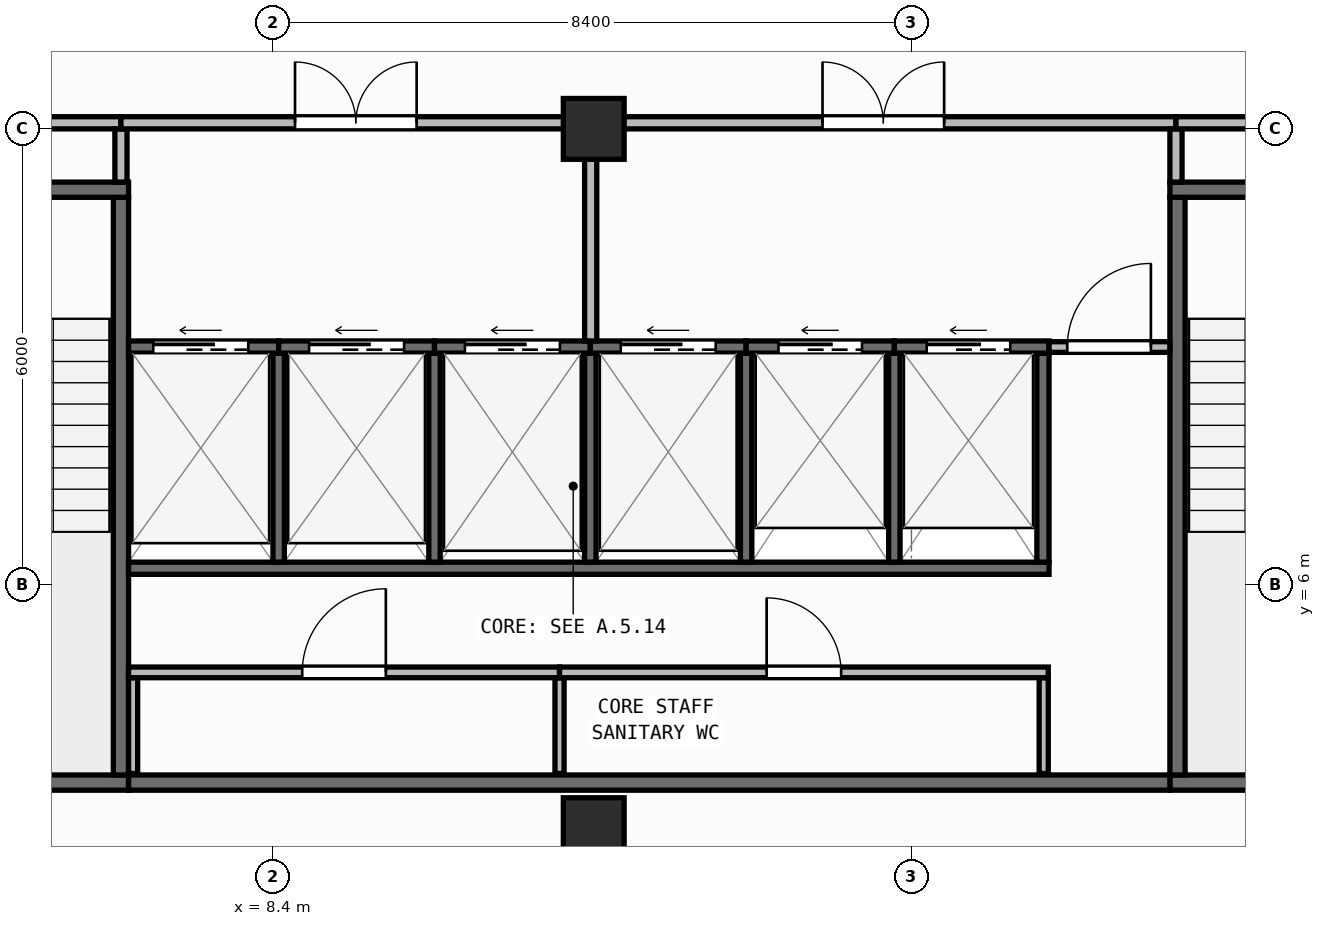
"""IFC4 building model, lengths in metres.
Left out: names, types, materials, properties, quantities, classifications, styles, units other than length and angle.
Written with IfcOpenShell. Run it as: python <this file> out.ifc"""

import sys

from ifc_helpers import new_model, si_unit, direction, frame, frame_2d, origin, origin_2d, place, context, subcontext, project, spatial, rectangle, extrude, element, fill, save


model = new_model("IFC4")
c1 = context("Model", 3, precision=1e-05, world=origin(), true_north=direction((0.0, 1.0)))
c2 = subcontext(c1, "Body", "Model", "MODEL_VIEW")
j1 = project(units=[si_unit("LENGTHUNIT", "METRE"), si_unit("PLANEANGLEUNIT", "RADIAN")], contexts=[c1])
p1 = place(None, origin())
s1 = spatial("IfcSite", under=j1, at=p1, CompositionType="ELEMENT")
p2 = place(p1, origin())
s2 = spatial("IfcBuilding", under=s1, at=p2, CompositionType="ELEMENT")
p3 = place(p2, frame((0.0, 0.0, 296.05)))
s3 = spatial("IfcBuildingStorey", under=s2, at=p3, CompositionType="ELEMENT", Elevation=296.05)
for number, where, z_axis, x_axis in (
    (1, (12.62, 2.8, 0.0), (0.0, 0.0, 1.0), (1.0, 0.0, 0.0)),
    (2, (12.62, 12.0, 0.0), (0.0, 0.0, 1.0), (1.0, 0.0, 0.0)),
):
    element("IfcColumn", number, at=place(p3, frame(where, z_axis=z_axis, x_axis=x_axis)), inside=s3, PredefinedType="COLUMN", context=c2, shape_type="SweptSolid", body=[
        extrude(rectangle(XDim=0.8, YDim=0.8, at=origin_2d()), origin(), (0.0, 0.0, 1.0), 3.95),
    ])
p4 = place(p3, frame((2.46, 0.171, 0.0), z_axis=(0.0, 0.0, 1.0), x_axis=(0.997760665813, 0.066885377746, 0.0)))
e3 = element("IfcWall", 3, at=p4, inside=s3, PredefinedType="STANDARD", context=c2, shape_type="SweptSolid", body=[
    extrude(rectangle(XDim=35.56, YDim=0.26, at=frame_2d((17.78, 0.0))), origin(), (0.0, 0.0, 1.0), 3.71),
])
p5 = place(p4, frame((16.58, 0.0, 0.9)))
e4 = element("IfcOpeningElement", 4, at=p5, cuts=e3, PredefinedType="OPENING", context=c2, shape_type="SweptSolid", body=[
    extrude(rectangle(XDim=2.4, YDim=1.65, at=frame_2d((1.2, 0.825))), frame((0.0, 0.14, 0.0), z_axis=(0.0, -1.0, 0.0), x_axis=(1.0, 0.0, 0.0)), (0.0, 0.0, 1.0), 0.28),
])
p6 = place(p3, frame((2.8, 3.4, 0.0), z_axis=(0.0, 0.0, 1.0), x_axis=(1.0, 0.0, 0.0)))
e5 = element("IfcWall", 5, at=p6, inside=s3, PredefinedType="SHEAR", context=c2, shape_type="SweptSolid", body=[
    extrude(rectangle(XDim=3.7, YDim=0.2, at=frame_2d((1.85, 0.0))), origin(), (0.0, 0.0, 1.0), 3.71),
])
p7 = place(p3, frame((6.4, 3.5, 0.0), z_axis=(0.0, 0.0, 1.0), x_axis=(0.0, 1.0, 0.0)))
e6 = element("IfcWall", 6, at=p7, inside=s3, PredefinedType="SHEAR", context=c2, shape_type="SweptSolid", body=[
    extrude(rectangle(XDim=7.6, YDim=0.2, at=frame_2d((3.8, 0.0))), origin(), (0.0, 0.0, 1.0), 3.71),
])
p8 = place(p3, frame((2.8, 11.2, 0.0), z_axis=(0.0, 0.0, 1.0), x_axis=(1.0, 0.0, 0.0)))
e7 = element("IfcWall", 7, at=p8, inside=s3, PredefinedType="SHEAR", context=c2, shape_type="SweptSolid", body=[
    extrude(rectangle(XDim=3.7, YDim=0.2, at=frame_2d((1.85, 0.0))), origin(), (0.0, 0.0, 1.0), 3.71),
])
p9 = place(p8, frame((1.2, 0.0, 0.0)))
e8 = element("IfcOpeningElement", 8, at=p9, cuts=e7, PredefinedType="OPENING", context=c2, shape_type="SweptSolid", body=[
    extrude(rectangle(XDim=1.3, YDim=2.15, at=frame_2d((0.65, 1.075))), frame((0.0, 0.11, 0.0), z_axis=(0.0, -1.0, 0.0), x_axis=(1.0, 0.0, 0.0)), (0.0, 0.0, 1.0), 0.22),
])
p10 = place(p3, frame((20.2, 3.4, 0.0), z_axis=(0.0, 0.0, 1.0), x_axis=(1.0, 0.0, 0.0)))
e9 = element("IfcWall", 9, at=p10, inside=s3, PredefinedType="SHEAR", context=c2, shape_type="SweptSolid", body=[
    extrude(rectangle(XDim=3.7, YDim=0.2, at=frame_2d((1.85, 0.0))), origin(), (0.0, 0.0, 1.0), 3.71),
])
p11 = place(p3, frame((20.3, 3.5, 0.0), z_axis=(0.0, 0.0, 1.0), x_axis=(0.0, 1.0, 0.0)))
e10 = element("IfcWall", 10, at=p11, inside=s3, PredefinedType="SHEAR", context=c2, shape_type="SweptSolid", body=[
    extrude(rectangle(XDim=7.6, YDim=0.2, at=frame_2d((3.8, 0.0))), origin(), (0.0, 0.0, 1.0), 3.71),
])
p12 = place(p3, frame((20.2, 11.2, 0.0), z_axis=(0.0, 0.0, 1.0), x_axis=(1.0, 0.0, 0.0)))
e11 = element("IfcWall", 11, at=p12, inside=s3, PredefinedType="SHEAR", context=c2, shape_type="SweptSolid", body=[
    extrude(rectangle(XDim=3.7, YDim=0.2, at=frame_2d((1.85, 0.0))), origin(), (0.0, 0.0, 1.0), 3.71),
])
p13 = place(p12, frame((1.2, 0.0, 0.0)))
e12 = element("IfcOpeningElement", 12, at=p13, cuts=e11, PredefinedType="OPENING", context=c2, shape_type="SweptSolid", body=[
    extrude(rectangle(XDim=1.3, YDim=2.15, at=frame_2d((0.65, 1.075))), frame((0.0, 0.11, 0.0), z_axis=(0.0, -1.0, 0.0), x_axis=(1.0, 0.0, 0.0)), (0.0, 0.0, 1.0), 0.22),
])
p14 = place(p3, frame((6.5, 3.4, 0.0), z_axis=(0.0, 0.0, 1.0), x_axis=(1.0, 0.0, 0.0)))
e13 = element("IfcWall", 13, at=p14, inside=s3, PredefinedType="SHEAR", context=c2, shape_type="SweptSolid", body=[
    extrude(rectangle(XDim=13.7, YDim=0.2, at=frame_2d((6.85, 0.0))), origin(), (0.0, 0.0, 1.0), 3.71),
])
p15 = place(p3, frame((6.5, 6.22, 0.0), z_axis=(0.0, 0.0, 1.0), x_axis=(1.0, 0.0, 0.0)))
e14 = element("IfcWall", 14, at=p15, inside=s3, PredefinedType="SHEAR", context=c2, shape_type="SweptSolid", body=[
    extrude(rectangle(XDim=12.11, YDim=0.16, at=frame_2d((6.055, 0.0))), origin(), (0.0, 0.0, 1.0), 3.71),
])
p16 = place(p3, frame((18.53, 6.3, 0.0), z_axis=(0.0, 0.0, 1.0), x_axis=(0.0, 1.0, 0.0)))
e15 = element("IfcWall", 15, at=p16, inside=s3, PredefinedType="SHEAR", context=c2, shape_type="SweptSolid", body=[
    extrude(rectangle(XDim=2.75, YDim=0.16, at=frame_2d((1.375, 0.0))), origin(), (0.0, 0.0, 1.0), 3.71),
])
for number, where, z_axis, x_axis in (
    (16, (8.475, 6.3, 0.0), (0.0, 0.0, 1.0), (0.0, 1.0, 0.0)),
    (17, (10.525, 6.3, 0.0), (0.0, 0.0, 1.0), (0.0, 1.0, 0.0)),
    (18, (12.575, 6.3, 0.0), (0.0, 0.0, 1.0), (0.0, 1.0, 0.0)),
    (19, (14.625, 6.3, 0.0), (0.0, 0.0, 1.0), (0.0, 1.0, 0.0)),
    (20, (16.575, 6.3, 0.0), (0.0, 0.0, 1.0), (0.0, 1.0, 0.0)),
):
    element("IfcWall", number, at=place(p3, frame(where, z_axis=z_axis, x_axis=x_axis)), inside=s3, PredefinedType="SHEAR", context=c2, shape_type="SweptSolid", body=[
        extrude(rectangle(XDim=2.75, YDim=0.15, at=frame_2d((1.375, 0.0))), origin(), (0.0, 0.0, 1.0), 3.71),
    ])
p17 = place(p3, frame((6.5, 9.13, 0.0), z_axis=(0.0, 0.0, 1.0), x_axis=(1.0, 0.0, 0.0)))
e21 = element("IfcWall", 21, at=p17, inside=s3, PredefinedType="SHEAR", context=c2, shape_type="SweptSolid", body=[
    extrude(rectangle(XDim=1.975, YDim=0.16, at=frame_2d((0.988, 0.0))), origin(), (0.0, 0.0, 1.0), 3.71),
])
p18 = place(p17, frame((0.325, 0.0, 0.0)))
e22 = element("IfcOpeningElement", 22, at=p18, cuts=e21, PredefinedType="OPENING", context=c2, shape_type="SweptSolid", body=[
    extrude(rectangle(XDim=1.25, YDim=2.15, at=frame_2d((0.625, 1.075))), frame((0.0, 0.09, 0.0), z_axis=(0.0, -1.0, 0.0), x_axis=(1.0, 0.0, 0.0)), (0.0, 0.0, 1.0), 0.18),
])
p19 = place(p3, frame((8.475, 9.13, 0.0), z_axis=(0.0, 0.0, 1.0), x_axis=(1.0, 0.0, 0.0)))
e23 = element("IfcWall", 23, at=p19, inside=s3, PredefinedType="SHEAR", context=c2, shape_type="SweptSolid", body=[
    extrude(rectangle(XDim=2.05, YDim=0.16, at=frame_2d((1.025, 0.0))), origin(), (0.0, 0.0, 1.0), 3.71),
])
p20 = place(p19, frame((0.4, 0.0, 0.0)))
e24 = element("IfcOpeningElement", 24, at=p20, cuts=e23, PredefinedType="OPENING", context=c2, shape_type="SweptSolid", body=[
    extrude(rectangle(XDim=1.25, YDim=2.15, at=frame_2d((0.625, 1.075))), frame((0.0, 0.09, 0.0), z_axis=(0.0, -1.0, 0.0), x_axis=(1.0, 0.0, 0.0)), (0.0, 0.0, 1.0), 0.18),
])
p21 = place(p3, frame((10.525, 9.13, 0.0), z_axis=(0.0, 0.0, 1.0), x_axis=(1.0, 0.0, 0.0)))
e25 = element("IfcWall", 25, at=p21, inside=s3, PredefinedType="SHEAR", context=c2, shape_type="SweptSolid", body=[
    extrude(rectangle(XDim=2.05, YDim=0.16, at=frame_2d((1.025, 0.0))), origin(), (0.0, 0.0, 1.0), 3.71),
])
p22 = place(p21, frame((0.4, 0.0, 0.0)))
e26 = element("IfcOpeningElement", 26, at=p22, cuts=e25, PredefinedType="OPENING", context=c2, shape_type="SweptSolid", body=[
    extrude(rectangle(XDim=1.25, YDim=2.15, at=frame_2d((0.625, 1.075))), frame((0.0, 0.09, 0.0), z_axis=(0.0, -1.0, 0.0), x_axis=(1.0, 0.0, 0.0)), (0.0, 0.0, 1.0), 0.18),
])
p23 = place(p3, frame((12.575, 9.13, 0.0), z_axis=(0.0, 0.0, 1.0), x_axis=(1.0, 0.0, 0.0)))
e27 = element("IfcWall", 27, at=p23, inside=s3, PredefinedType="SHEAR", context=c2, shape_type="SweptSolid", body=[
    extrude(rectangle(XDim=2.05, YDim=0.16, at=frame_2d((1.025, 0.0))), origin(), (0.0, 0.0, 1.0), 3.71),
])
p24 = place(p23, frame((0.4, 0.0, 0.0)))
e28 = element("IfcOpeningElement", 28, at=p24, cuts=e27, PredefinedType="OPENING", context=c2, shape_type="SweptSolid", body=[
    extrude(rectangle(XDim=1.25, YDim=2.15, at=frame_2d((0.625, 1.075))), frame((0.0, 0.09, 0.0), z_axis=(0.0, -1.0, 0.0), x_axis=(1.0, 0.0, 0.0)), (0.0, 0.0, 1.0), 0.18),
])
p25 = place(p3, frame((14.625, 9.13, 0.0), z_axis=(0.0, 0.0, 1.0), x_axis=(1.0, 0.0, 0.0)))
e29 = element("IfcWall", 29, at=p25, inside=s3, PredefinedType="SHEAR", context=c2, shape_type="SweptSolid", body=[
    extrude(rectangle(XDim=1.95, YDim=0.16, at=frame_2d((0.975, 0.0))), origin(), (0.0, 0.0, 1.0), 3.71),
])
p26 = place(p25, frame((0.425, 0.0, 0.0)))
e30 = element("IfcOpeningElement", 30, at=p26, cuts=e29, PredefinedType="OPENING", context=c2, shape_type="SweptSolid", body=[
    extrude(rectangle(XDim=1.1, YDim=2.15, at=frame_2d((0.55, 1.075))), frame((0.0, 0.09, 0.0), z_axis=(0.0, -1.0, 0.0), x_axis=(1.0, 0.0, 0.0)), (0.0, 0.0, 1.0), 0.18),
])
p27 = place(p3, frame((16.575, 9.13, 0.0), z_axis=(0.0, 0.0, 1.0), x_axis=(1.0, 0.0, 0.0)))
e31 = element("IfcWall", 31, at=p27, inside=s3, PredefinedType="SHEAR", context=c2, shape_type="SweptSolid", body=[
    extrude(rectangle(XDim=2.035, YDim=0.16, at=frame_2d((1.018, 0.0))), origin(), (0.0, 0.0, 1.0), 3.71),
])
p28 = place(p27, frame((0.425, 0.0, 0.0)))
e32 = element("IfcOpeningElement", 32, at=p28, cuts=e31, PredefinedType="OPENING", context=c2, shape_type="SweptSolid", body=[
    extrude(rectangle(XDim=1.1, YDim=2.15, at=frame_2d((0.55, 1.075))), frame((0.0, 0.09, 0.0), z_axis=(0.0, -1.0, 0.0), x_axis=(1.0, 0.0, 0.0)), (0.0, 0.0, 1.0), 0.18),
])
for number, where, z_axis, x_axis in (
    (33, (6.56, 3.52, 0.0), (0.0, 0.0, 1.0), (0.0, 1.0, 0.0)),
    (34, (12.17, 3.52, 0.0), (0.0, 0.0, 1.0), (0.0, 1.0, 0.0)),
    (35, (18.54, 3.52, 0.0), (0.0, 0.0, 1.0), (0.0, 1.0, 0.0)),
):
    element("IfcWall", number, at=place(p3, frame(where, z_axis=z_axis, x_axis=x_axis)), inside=s3, PredefinedType="PARTITIONING", context=c2, shape_type="SweptSolid", body=[
        extrude(rectangle(XDim=1.26, YDim=0.12, at=frame_2d((0.63, 0.0))), origin(), (0.0, 0.0, 1.0), 3.71),
    ])
p29 = place(p3, frame((6.5, 4.85, 0.0), z_axis=(0.0, 0.0, 1.0), x_axis=(1.0, 0.0, 0.0)))
e36 = element("IfcWall", 36, at=p29, inside=s3, PredefinedType="PARTITIONING", context=c2, shape_type="SweptSolid", body=[
    extrude(rectangle(XDim=5.67, YDim=0.14, at=frame_2d((2.835, 0.0))), origin(), (0.0, 0.0, 1.0), 3.71),
])
p30 = place(p29, frame((2.285, 0.0, 0.0)))
e37 = element("IfcOpeningElement", 37, at=p30, cuts=e36, PredefinedType="OPENING", context=c2, shape_type="SweptSolid", body=[
    extrude(rectangle(XDim=1.1, YDim=2.1, at=frame_2d((0.55, 1.05))), frame((0.0, 0.08, 0.0), z_axis=(0.0, -1.0, 0.0), x_axis=(1.0, 0.0, 0.0)), (0.0, 0.0, 1.0), 0.16),
])
p31 = place(p3, frame((12.17, 4.85, 0.0), z_axis=(0.0, 0.0, 1.0), x_axis=(1.0, 0.0, 0.0)))
e38 = element("IfcWall", 38, at=p31, inside=s3, PredefinedType="PARTITIONING", context=c2, shape_type="SweptSolid", body=[
    extrude(rectangle(XDim=6.43, YDim=0.14, at=frame_2d((3.215, 0.0))), origin(), (0.0, 0.0, 1.0), 3.71),
])
p32 = place(p31, frame((2.725, 0.0, 0.0)))
e39 = element("IfcOpeningElement", 39, at=p32, cuts=e38, PredefinedType="OPENING", context=c2, shape_type="SweptSolid", body=[
    extrude(rectangle(XDim=0.98, YDim=2.1, at=frame_2d((0.49, 1.05))), frame((0.0, 0.08, 0.0), z_axis=(0.0, -1.0, 0.0), x_axis=(1.0, 0.0, 0.0)), (0.0, 0.0, 1.0), 0.16),
])
p33 = place(p3, frame((18.61, 9.13, 0.0), z_axis=(0.0, 0.0, 1.0), x_axis=(1.0, 0.0, 0.0)))
e40 = element("IfcWall", 40, at=p33, inside=s3, PredefinedType="PARTITIONING", context=c2, shape_type="SweptSolid", body=[
    extrude(rectangle(XDim=1.59, YDim=0.14, at=frame_2d((0.795, 0.0))), origin(), (0.0, 0.0, 1.0), 3.71),
])
p34 = place(p33, frame((0.24, 0.0, 0.0)))
e41 = element("IfcOpeningElement", 41, at=p34, cuts=e40, PredefinedType="OPENING", context=c2, shape_type="SweptSolid", body=[
    extrude(rectangle(XDim=1.1, YDim=2.1, at=frame_2d((0.55, 1.05))), frame((0.0, 0.08, 0.0), z_axis=(0.0, -1.0, 0.0), x_axis=(1.0, 0.0, 0.0)), (0.0, 0.0, 1.0), 0.16),
])
p35 = place(p3, frame((2.8, 12.08, 0.0), z_axis=(0.0, 0.0, 1.0), x_axis=(1.0, 0.0, 0.0)))
e42 = element("IfcWall", 42, at=p35, inside=s3, PredefinedType="PARTITIONING", context=c2, shape_type="SweptSolid", body=[
    extrude(rectangle(XDim=3.6, YDim=0.16, at=frame_2d((1.8, 0.0))), origin(), (0.0, 0.0, 1.0), 3.157),
])
p36 = place(p35, frame((1.0, 0.0, 0.0)))
e43 = element("IfcOpeningElement", 43, at=p36, cuts=e42, PredefinedType="OPENING", context=c2, shape_type="SweptSolid", body=[
    extrude(rectangle(XDim=1.6, YDim=2.05, at=frame_2d((0.8, 1.025))), frame((0.0, 0.09, 0.0), z_axis=(0.0, -1.0, 0.0), x_axis=(1.0, 0.0, 0.0)), (0.0, 0.0, 1.0), 0.18),
])
p37 = place(p3, frame((6.4, 11.3, 0.0), z_axis=(0.0, 0.0, 1.0), x_axis=(0.0, 1.0, 0.0)))
e44 = element("IfcWall", 44, at=p37, inside=s3, PredefinedType="PARTITIONING", context=c2, shape_type="SweptSolid", body=[
    extrude(rectangle(XDim=0.7, YDim=0.16, at=frame_2d((0.35, 0.0))), origin(), (0.0, 0.0, 1.0), 3.71),
])
p38 = place(p3, frame((6.4, 12.08, 0.0), z_axis=(0.0, 0.0, 1.0), x_axis=(1.0, 0.0, 0.0)))
e45 = element("IfcWall", 45, at=p38, inside=s3, PredefinedType="PARTITIONING", context=c2, shape_type="SweptSolid", body=[
    extrude(rectangle(XDim=6.18, YDim=0.16, at=frame_2d((3.09, 0.0))), origin(), (0.0, 0.0, 1.0), 3.157),
])
p39 = place(p38, frame((2.29, 0.0, 0.0)))
e46 = element("IfcOpeningElement", 46, at=p39, cuts=e45, PredefinedType="OPENING", context=c2, shape_type="SweptSolid", body=[
    extrude(rectangle(XDim=1.6, YDim=2.05, at=frame_2d((0.8, 1.025))), frame((0.0, 0.09, 0.0), z_axis=(0.0, -1.0, 0.0), x_axis=(1.0, 0.0, 0.0)), (0.0, 0.0, 1.0), 0.18),
])
p40 = place(p3, frame((12.58, 9.21, 0.0), z_axis=(0.0, 0.0, 1.0), x_axis=(0.0, 1.0, 0.0)))
e47 = element("IfcWall", 47, at=p40, inside=s3, PredefinedType="PARTITIONING", context=c2, shape_type="SweptSolid", body=[
    extrude(rectangle(XDim=2.79, YDim=0.16, at=frame_2d((1.395, 0.0))), origin(), (0.0, 0.0, 1.0), 3.71),
])
p41 = place(p3, frame((12.58, 12.08, 0.0), z_axis=(0.0, 0.0, 1.0), x_axis=(1.0, 0.0, 0.0)))
e48 = element("IfcWall", 48, at=p41, inside=s3, PredefinedType="PARTITIONING", context=c2, shape_type="SweptSolid", body=[
    extrude(rectangle(XDim=7.7, YDim=0.16, at=frame_2d((3.85, 0.0))), origin(), (0.0, 0.0, 1.0), 3.157),
])
p42 = place(p41, frame((3.05, 0.0, 0.0)))
e49 = element("IfcOpeningElement", 49, at=p42, cuts=e48, PredefinedType="OPENING", context=c2, shape_type="SweptSolid", body=[
    extrude(rectangle(XDim=1.6, YDim=2.05, at=frame_2d((0.8, 1.025))), frame((0.0, 0.09, 0.0), z_axis=(0.0, -1.0, 0.0), x_axis=(1.0, 0.0, 0.0)), (0.0, 0.0, 1.0), 0.18),
])
p43 = place(p3, frame((20.28, 11.3, 0.0), z_axis=(0.0, 0.0, 1.0), x_axis=(0.0, 1.0, 0.0)))
e50 = element("IfcWall", 50, at=p43, inside=s3, PredefinedType="PARTITIONING", context=c2, shape_type="SweptSolid", body=[
    extrude(rectangle(XDim=0.7, YDim=0.16, at=frame_2d((0.35, 0.0))), origin(), (0.0, 0.0, 1.0), 3.71),
])
p44 = place(p3, frame((20.28, 12.08, 0.0), z_axis=(0.0, 0.0, 1.0), x_axis=(1.0, 0.0, 0.0)))
e51 = element("IfcWall", 51, at=p44, inside=s3, PredefinedType="PARTITIONING", context=c2, shape_type="SweptSolid", body=[
    extrude(rectangle(XDim=3.62, YDim=0.16, at=frame_2d((1.81, 0.0))), origin(), (0.0, 0.0, 1.0), 3.157),
])
p45 = place(p44, frame((1.01, 0.0, 0.0)))
e52 = element("IfcOpeningElement", 52, at=p45, cuts=e51, PredefinedType="OPENING", context=c2, shape_type="SweptSolid", body=[
    extrude(rectangle(XDim=1.6, YDim=2.05, at=frame_2d((0.8, 1.025))), frame((0.0, 0.09, 0.0), z_axis=(0.0, -1.0, 0.0), x_axis=(1.0, 0.0, 0.0)), (0.0, 0.0, 1.0), 0.18),
])
p46 = place(p18, origin())
e53 = element("IfcDoor", 53, at=p46, inside=s3, OperationType="SLIDING_TO_LEFT", PredefinedType="DOOR", context=c2, shape_type="SweptSolid", body=[
    extrude(rectangle(XDim=1.25, YDim=2.15, at=frame_2d((0.625, 1.075))), frame((0.0, 0.025, 0.0), z_axis=(0.0, -1.0, 0.0), x_axis=(1.0, 0.0, 0.0)), (0.0, 0.0, 1.0), 0.05),
])
fill(e22, e53)
p47 = place(p20, origin())
e54 = element("IfcDoor", 54, at=p47, inside=s3, OperationType="SLIDING_TO_LEFT", PredefinedType="DOOR", context=c2, shape_type="SweptSolid", body=[
    extrude(rectangle(XDim=1.25, YDim=2.15, at=frame_2d((0.625, 1.075))), frame((0.0, 0.025, 0.0), z_axis=(0.0, -1.0, 0.0), x_axis=(1.0, 0.0, 0.0)), (0.0, 0.0, 1.0), 0.05),
])
fill(e24, e54)
p48 = place(p22, origin())
e55 = element("IfcDoor", 55, at=p48, inside=s3, OperationType="SLIDING_TO_LEFT", PredefinedType="DOOR", context=c2, shape_type="SweptSolid", body=[
    extrude(rectangle(XDim=1.25, YDim=2.15, at=frame_2d((0.625, 1.075))), frame((0.0, 0.025, 0.0), z_axis=(0.0, -1.0, 0.0), x_axis=(1.0, 0.0, 0.0)), (0.0, 0.0, 1.0), 0.05),
])
fill(e26, e55)
p49 = place(p24, origin())
e56 = element("IfcDoor", 56, at=p49, inside=s3, OperationType="SLIDING_TO_LEFT", PredefinedType="DOOR", context=c2, shape_type="SweptSolid", body=[
    extrude(rectangle(XDim=1.25, YDim=2.15, at=frame_2d((0.625, 1.075))), frame((0.0, 0.025, 0.0), z_axis=(0.0, -1.0, 0.0), x_axis=(1.0, 0.0, 0.0)), (0.0, 0.0, 1.0), 0.05),
])
fill(e28, e56)
p50 = place(p26, origin())
e57 = element("IfcDoor", 57, at=p50, inside=s3, OperationType="SLIDING_TO_LEFT", PredefinedType="DOOR", context=c2, shape_type="SweptSolid", body=[
    extrude(rectangle(XDim=1.1, YDim=2.15, at=frame_2d((0.55, 1.075))), frame((0.0, 0.025, 0.0), z_axis=(0.0, -1.0, 0.0), x_axis=(1.0, 0.0, 0.0)), (0.0, 0.0, 1.0), 0.05),
])
fill(e30, e57)
p51 = place(p28, origin())
e58 = element("IfcDoor", 58, at=p51, inside=s3, OperationType="SLIDING_TO_LEFT", PredefinedType="DOOR", context=c2, shape_type="SweptSolid", body=[
    extrude(rectangle(XDim=1.1, YDim=2.15, at=frame_2d((0.55, 1.075))), frame((0.0, 0.025, 0.0), z_axis=(0.0, -1.0, 0.0), x_axis=(1.0, 0.0, 0.0)), (0.0, 0.0, 1.0), 0.05),
])
fill(e32, e58)
p52 = place(p30, origin())
e59 = element("IfcDoor", 59, at=p52, inside=s3, OperationType="SINGLE_SWING_RIGHT", PredefinedType="DOOR", context=c2, shape_type="SweptSolid", body=[
    extrude(rectangle(XDim=1.1, YDim=2.1, at=frame_2d((0.55, 1.05))), frame((0.0, 0.025, 0.0), z_axis=(0.0, -1.0, 0.0), x_axis=(1.0, 0.0, 0.0)), (0.0, 0.0, 1.0), 0.05),
])
fill(e37, e59)
p53 = place(p32, origin())
e60 = element("IfcDoor", 60, at=p53, inside=s3, OperationType="SINGLE_SWING_LEFT", PredefinedType="DOOR", context=c2, shape_type="SweptSolid", body=[
    extrude(rectangle(XDim=0.98, YDim=2.1, at=frame_2d((0.49, 1.05))), frame((0.0, 0.025, 0.0), z_axis=(0.0, -1.0, 0.0), x_axis=(1.0, 0.0, 0.0)), (0.0, 0.0, 1.0), 0.05),
])
fill(e39, e60)
p54 = place(p34, origin())
e61 = element("IfcDoor", 61, at=p54, inside=s3, OperationType="SINGLE_SWING_RIGHT", PredefinedType="DOOR", context=c2, shape_type="SweptSolid", body=[
    extrude(rectangle(XDim=1.1, YDim=2.1, at=frame_2d((0.55, 1.05))), frame((0.0, 0.025, 0.0), z_axis=(0.0, -1.0, 0.0), x_axis=(1.0, 0.0, 0.0)), (0.0, 0.0, 1.0), 0.05),
])
fill(e41, e61)
p55 = place(p39, origin())
e62 = element("IfcDoor", 62, at=p55, inside=s3, OperationType="DOUBLE_DOOR_SINGLE_SWING", PredefinedType="DOOR", context=c2, shape_type="SweptSolid", body=[
    extrude(rectangle(XDim=1.6, YDim=2.05, at=frame_2d((0.8, 1.025))), frame((0.0, 0.025, 0.0), z_axis=(0.0, -1.0, 0.0), x_axis=(1.0, 0.0, 0.0)), (0.0, 0.0, 1.0), 0.05),
])
fill(e46, e62)
p56 = place(p42, origin())
e63 = element("IfcDoor", 63, at=p56, inside=s3, OperationType="DOUBLE_DOOR_SINGLE_SWING", PredefinedType="DOOR", context=c2, shape_type="SweptSolid", body=[
    extrude(rectangle(XDim=1.6, YDim=2.05, at=frame_2d((0.8, 1.025))), frame((0.0, 0.025, 0.0), z_axis=(0.0, -1.0, 0.0), x_axis=(1.0, 0.0, 0.0)), (0.0, 0.0, 1.0), 0.05),
])
fill(e49, e63)
save(model, sys.argv[1])
